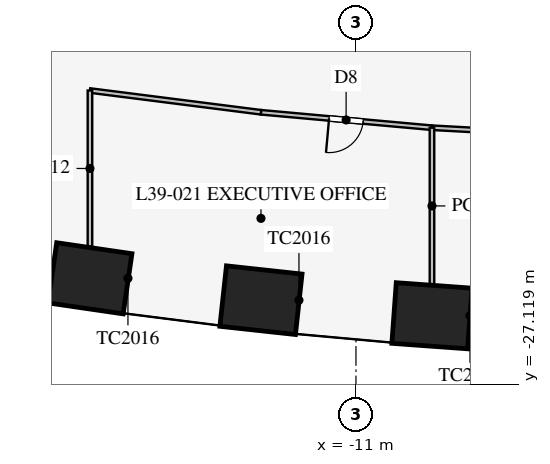
"""IFC4 building model, lengths in metres.
Left out: names, types, materials, properties, quantities, classifications, styles, units other than length and angle.
Written with IfcOpenShell. Run it as: python <this file> out.ifc"""

import sys

from ifc_helpers import new_model, si_unit, direction, frame, frame_2d, origin, origin_2d, place, context, subcontext, project, spatial, rectangle, extrude, element, fill, save


model = new_model("IFC4")
c1 = context("Model", 3, precision=1e-05, world=origin(), true_north=direction((0.0, 1.0)))
c2 = subcontext(c1, "Body", "Model", "MODEL_VIEW")
j1 = project(units=[si_unit("LENGTHUNIT", "METRE"), si_unit("PLANEANGLEUNIT", "RADIAN")], contexts=[c1])
p1 = place(None, origin())
s1 = spatial("IfcSite", under=j1, at=p1, CompositionType="ELEMENT")
p2 = place(p1, origin())
s2 = spatial("IfcBuilding", under=s1, at=p2, CompositionType="ELEMENT")
p3 = place(p2, frame((0.0, 0.0, 170.3)))
s3 = spatial("IfcBuildingStorey", under=s2, at=p3, CompositionType="ELEMENT", Elevation=170.3)
for number, where, z_axis, x_axis in (
    (1, (-18.0, -24.337, 0.0), (0.0, 0.0, 1.0), (0.99, -0.144, 0.0)),
    (2, (-13.5, -24.913, 0.0), (0.0, 0.0, 1.0), (0.994, -0.108, 0.0)),
    (3, (-9.0, -25.323, 0.0), (0.0, 0.0, 1.0), (0.997, -0.072, 0.0)),
):
    element("IfcColumn", number, at=place(p3, frame(where, z_axis=z_axis, x_axis=x_axis)), inside=s3, PredefinedType="COLUMN", context=c2, shape_type="SweptSolid", body=[
        extrude(rectangle(XDim=2.0, YDim=1.6, at=origin_2d()), origin(), (0.0, 0.0, 1.0), 4.2),
    ])
p4 = place(p3, frame((-13.5, -19.968, 0.0), z_axis=(0.0, 0.0, 1.0), x_axis=(0.995930325215, -0.090126507295, 0.0)))
e4 = element("IfcWall", 4, at=p4, inside=s3, PredefinedType="PARTITIONING", context=c2, shape_type="SweptSolid", body=[
    extrude(rectangle(XDim=4.518, YDim=0.12, at=frame_2d((2.259, 0.0))), origin(), (0.0, 0.0, 1.0), 2.9),
])
p5 = place(p4, frame((1.8, 0.0, 0.15)))
e5 = element("IfcOpeningElement", 5, at=p5, cuts=e4, PredefinedType="OPENING", context=c2, shape_type="SweptSolid", body=[
    extrude(rectangle(XDim=0.9, YDim=2.1, at=frame_2d((0.45, 1.05))), frame((0.0, 0.07, 0.0), z_axis=(0.0, -1.0, 0.0), x_axis=(1.0, 0.0, 0.0)), (0.0, 0.0, 1.0), 0.14),
])
p6 = place(p3, frame((-18.0, -19.396, 0.0), z_axis=(0.0, 0.0, 1.0), x_axis=(0.992010652594, -0.12615413247, 0.0)))
e6 = element("IfcWall", 6, at=p6, inside=s3, PredefinedType="PARTITIONING", context=c2, shape_type="SweptSolid", body=[
    extrude(rectangle(XDim=4.536, YDim=0.12, at=frame_2d((2.268, 0.0))), origin(), (0.0, 0.0, 1.0), 2.9),
])
p7 = place(p3, frame((-9.0, -20.375, 0.0), z_axis=(0.0, 0.0, 1.0), x_axis=(0.998537376538, -0.054065771581, 0.0)))
e7 = element("IfcWall", 7, at=p7, inside=s3, PredefinedType="PARTITIONING", context=c2, shape_type="SweptSolid", body=[
    extrude(rectangle(XDim=4.507, YDim=0.12, at=frame_2d((2.253, 0.0))), origin(), (0.0, 0.0, 1.0), 2.9),
])
p8 = place(p3, frame((-18.0, -19.396, 0.0), z_axis=(0.0, 0.0, 1.0), x_axis=(0.0, -1.0, 0.0)))
e8 = element("IfcWall", 8, at=p8, inside=s3, PredefinedType="PARTITIONING", context=c2, shape_type="SweptSolid", body=[
    extrude(rectangle(XDim=4.103, YDim=0.12, at=frame_2d((2.052, 0.0))), origin(), (0.0, 0.0, 1.0), 2.4),
])
p9 = place(p3, frame((-9.0, -20.375, 0.0), z_axis=(0.0, 0.0, 1.0), x_axis=(0.0, -1.0, 0.0)))
e9 = element("IfcWall", 9, at=p9, inside=s3, PredefinedType="PARTITIONING", context=c2, shape_type="SweptSolid", body=[
    extrude(rectangle(XDim=4.116, YDim=0.12, at=frame_2d((2.058, 0.0))), origin(), (0.0, 0.0, 1.0), 2.6),
])
p10 = place(p5, frame((0.9, 0.0, 0.0), z_axis=(0.0, 0.0, 1.0), x_axis=(-1.0, 0.0, 0.0)))
e10 = element("IfcDoor", 10, at=p10, inside=s3, OperationType="SINGLE_SWING_RIGHT", PredefinedType="DOOR", context=c2, shape_type="SweptSolid", body=[
    extrude(rectangle(XDim=0.9, YDim=2.1, at=frame_2d((0.45, 1.05))), frame((0.0, 0.025, 0.0), z_axis=(0.0, -1.0, 0.0), x_axis=(1.0, 0.0, 0.0)), (0.0, 0.0, 1.0), 0.05),
])
fill(e5, e10)
save(model, sys.argv[1])
